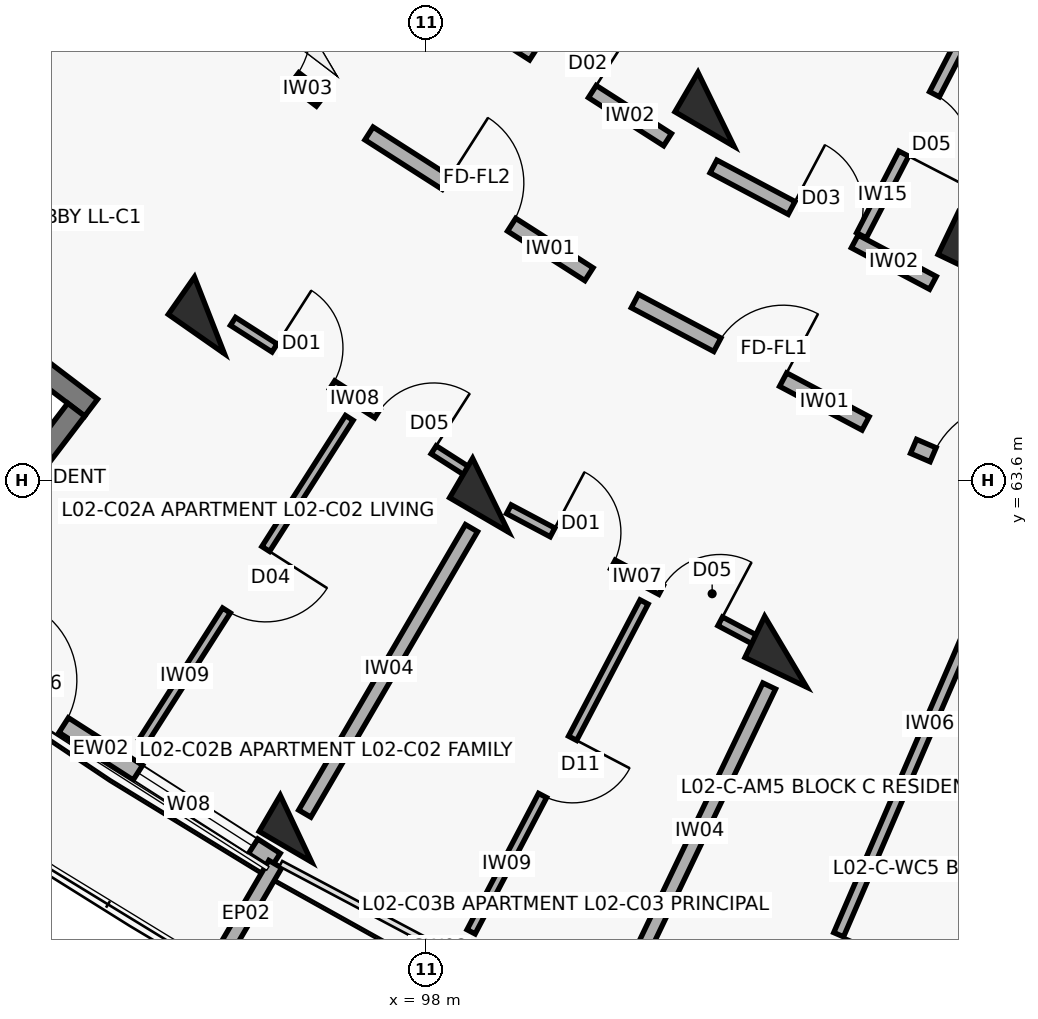
"""IFC4 building model, lengths in metres.
Left out: names, types, materials, properties, quantities, classifications, styles, units other than length and angle.
Written with IfcOpenShell. Run it as: python <this file> out.ifc"""

import sys

from ifc_helpers import new_model, si_unit, direction, frame, frame_2d, origin, origin_2d, place, context, subcontext, project, spatial, rectangle, extrude, element, fill, save


model = new_model("IFC4")
c1 = context("Model", 3, precision=1e-05, world=origin(), true_north=direction((0.0, 1.0)))
c2 = subcontext(c1, "Body", "Model", "MODEL_VIEW")
j1 = project(units=[si_unit("LENGTHUNIT", "METRE"), si_unit("PLANEANGLEUNIT", "RADIAN")], contexts=[c1])
p1 = place(None, origin())
s1 = spatial("IfcSite", under=j1, at=p1, CompositionType="ELEMENT")
p2 = place(p1, origin())
s2 = spatial("IfcBuilding", under=s1, at=p2, CompositionType="ELEMENT")
p3 = place(p2, frame((0.0, 0.0, 8.1)))
s3 = spatial("IfcBuildingStorey", under=s2, at=p3, CompositionType="ELEMENT", Elevation=8.1)
for number, where, z_axis, x_axis in (
    (1, (95.152, 65.768, 0.0), (0.0, 0.0, 1.0), (-0.573, -0.82, 0.0)),
    (2, (101.817, 68.478, 0.0), (0.0, 0.0, 1.0), (-0.504, -0.864, 0.0)),
    (3, (98.853, 63.4, 0.0), (0.0, 0.0, 1.0), (-0.504, -0.864, 0.0)),
):
    element("IfcColumn", number, at=place(p3, frame(where, z_axis=z_axis, x_axis=x_axis)), inside=s3, PredefinedType="COLUMN", context=c2, shape_type="SweptSolid", body=[
        extrude(rectangle(XDim=0.6, YDim=0.9, at=origin_2d()), origin(), (0.0, 0.0, 1.0), 3.1),
    ])
p4 = place(p3, frame((96.291, 59.013, 0.0), z_axis=(0.0, 0.0, 1.0), x_axis=(-0.504226211181, -0.863571611366, 0.0)))
e4 = element("IfcColumn", 4, at=p4, inside=s3, PredefinedType="COLUMN", context=c2, shape_type="SweptSolid", body=[
    extrude(rectangle(XDim=0.55, YDim=0.8, at=origin_2d()), origin(), (0.0, 0.0, 1.0), 3.1),
])
for number, where, z_axis, x_axis in (
    (5, (105.274, 66.644, 0.0), (0.0, 0.0, 1.0), (-0.432, -0.902, 0.0)),
    (6, (102.734, 61.341, 0.0), (0.0, 0.0, 1.0), (-0.432, -0.902, 0.0)),
):
    element("IfcColumn", number, at=place(p3, frame(where, z_axis=z_axis, x_axis=x_axis)), inside=s3, PredefinedType="COLUMN", context=c2, shape_type="SweptSolid", body=[
        extrude(rectangle(XDim=0.6, YDim=0.9, at=origin_2d()), origin(), (0.0, 0.0, 1.0), 3.1),
    ])
p5 = place(p3, frame((91.972, 61.184, 0.0), z_axis=(0.0, 0.0, 1.0), x_axis=(0.84226218024, -0.539068103061, 0.0)))
e7 = element("IfcWall", 7, at=p5, inside=s3, PredefinedType="SOLIDWALL", context=c2, shape_type="SweptSolid", body=[
    extrude(rectangle(XDim=4.809, YDim=0.23, at=frame_2d((2.404, 0.0))), origin(), (0.0, 0.0, 1.0), 2.25),
])
p6 = place(p5, frame((0.4, 0.0, 0.0)))
e8 = element("IfcOpeningElement", 8, at=p6, cuts=e7, PredefinedType="OPENING", context=c2, shape_type="SweptSolid", body=[
    extrude(rectangle(XDim=1.1, YDim=2.15, at=frame_2d((0.55, 1.075))), frame((0.0, 0.125, 0.0), z_axis=(0.0, -1.0, 0.0), x_axis=(1.0, 0.0, 0.0)), (0.0, 0.0, 1.0), 0.25),
])
p7 = place(p5, frame((2.659, 0.0, 0.35)))
e9 = element("IfcOpeningElement", 9, at=p7, cuts=e7, PredefinedType="OPENING", context=c2, shape_type="SweptSolid", body=[
    extrude(rectangle(XDim=1.8, YDim=1.65, at=frame_2d((0.9, 0.825))), frame((0.0, 0.125, 0.0), z_axis=(0.0, -1.0, 0.0), x_axis=(1.0, 0.0, 0.0)), (0.0, 0.0, 1.0), 0.25),
])
p8 = place(p3, frame((96.019, 58.547, 0.0), z_axis=(0.0, 0.0, 1.0), x_axis=(-0.504228145431, -0.863570481985, 0.0)))
e10 = element("IfcWall", 10, at=p8, inside=s3, PredefinedType="PARAPET", context=c2, shape_type="SweptSolid", body=[
    extrude(rectangle(XDim=1.53, YDim=0.195, at=frame_2d((0.765, 0.0))), origin(), (0.0, 0.0, 1.0), 2.25),
])
p9 = place(p3, frame((93.325, 70.899, 0.0), z_axis=(0.0, 0.0, 1.0), x_axis=(-0.668868253964, -0.743380964808, 0.0)))
e11 = element("IfcWall", 11, at=p9, inside=s3, PredefinedType="SHEAR", context=c2, shape_type="SweptSolid", body=[
    extrude(rectangle(XDim=7.69, YDim=0.3, at=frame_2d((3.845, 0.0))), origin(), (0.0, 0.0, 1.0), 3.1),
])
p10 = place(p3, frame((90.899, 66.607, 0.0), z_axis=(0.0, 0.0, 1.0), x_axis=(0.795439986025, -0.606032365994, 0.0)))
e12 = element("IfcWall", 12, at=p10, inside=s3, PredefinedType="SHEAR", context=c2, shape_type="SweptSolid", body=[
    extrude(rectangle(XDim=3.39, YDim=0.28, at=frame_2d((1.695, 0.0))), origin(), (0.0, 0.0, 1.0), 3.1),
])
p11 = place(p10, frame((1.095, 0.0, 0.0)))
e13 = element("IfcOpeningElement", 13, at=p11, cuts=e12, PredefinedType="OPENING", context=c2, shape_type="SweptSolid", body=[
    extrude(rectangle(XDim=1.2, YDim=2.15, at=frame_2d((0.6, 1.075))), frame((0.0, 0.15, 0.0), z_axis=(0.0, -1.0, 0.0), x_axis=(1.0, 0.0, 0.0)), (0.0, 0.0, 1.0), 0.3),
])
p12 = place(p3, frame((93.4, 64.526, 0.0), z_axis=(0.0, 0.0, 1.0), x_axis=(-0.605891019062, -0.795547656033, 0.0)))
e14 = element("IfcWall", 14, at=p12, inside=s3, PredefinedType="SHEAR", context=c2, shape_type="SweptSolid", body=[
    extrude(rectangle(XDim=2.03, YDim=0.28, at=frame_2d((1.015, 0.0))), origin(), (0.0, 0.0, 1.0), 3.1),
])
p13 = place(p3, frame((94.001, 70.602, 0.0), z_axis=(0.0, 0.0, 1.0), x_axis=(0.795498026433, -0.605956178235, 0.0)))
e15 = element("IfcWall", 15, at=p13, inside=s3, PredefinedType="SOLIDWALL", context=c2, shape_type="SweptSolid", body=[
    extrude(rectangle(XDim=3.296, YDim=0.21, at=frame_2d((1.648, 0.0))), origin(), (0.0, 0.0, 1.0), 2.08),
])
p14 = place(p13, frame((0.45, 0.0, 0.0)))
e16 = element("IfcOpeningElement", 16, at=p14, cuts=e15, PredefinedType="OPENING", context=c2, shape_type="SweptSolid", body=[
    extrude(rectangle(XDim=1.1, YDim=2.15, at=frame_2d((0.55, 1.075))), frame((0.0, 0.115, 0.0), z_axis=(0.0, -1.0, 0.0), x_axis=(1.0, 0.0, 0.0)), (0.0, 0.0, 1.0), 0.23),
])
p15 = place(p13, frame((1.726, 0.0, 0.0)))
e17 = element("IfcOpeningElement", 17, at=p15, cuts=e15, PredefinedType="OPENING", context=c2, shape_type="SweptSolid", body=[
    extrude(rectangle(XDim=1.12, YDim=2.15, at=frame_2d((0.56, 1.075))), frame((0.0, 0.115, 0.0), z_axis=(0.0, -1.0, 0.0), x_axis=(1.0, 0.0, 0.0)), (0.0, 0.0, 1.0), 0.23),
])
p16 = place(p3, frame((97.252, 68.161, 0.0), z_axis=(0.0, 0.0, 1.0), x_axis=(0.842289466461, -0.53902546757, 0.0)))
e18 = element("IfcWall", 18, at=p16, inside=s3, PredefinedType="SOLIDWALL", context=c2, shape_type="SweptSolid", body=[
    extrude(rectangle(XDim=3.436, YDim=0.2, at=frame_2d((1.718, 0.0))), origin(), (0.0, 0.0, 1.0), 2.08),
])
p17 = place(p16, frame((1.208, 0.0, 0.0)))
e19 = element("IfcOpeningElement", 19, at=p17, cuts=e18, PredefinedType="OPENING", context=c2, shape_type="SweptSolid", body=[
    extrude(rectangle(XDim=1.02, YDim=2.15, at=frame_2d((0.51, 1.075))), frame((0.0, 0.11, 0.0), z_axis=(0.0, -1.0, 0.0), x_axis=(1.0, 0.0, 0.0)), (0.0, 0.0, 1.0), 0.22),
])
p18 = place(p3, frame((98.427, 69.841, 0.0), z_axis=(0.0, 0.0, 1.0), x_axis=(0.842280895761, -0.539038860043, 0.0)))
e20 = element("IfcWall", 20, at=p18, inside=s3, PredefinedType="SOLIDWALL", context=c2, shape_type="SweptSolid", body=[
    extrude(rectangle(XDim=3.269, YDim=0.19, at=frame_2d((1.634, 0.0))), origin(), (0.0, 0.0, 1.0), 2.08),
])
p19 = place(p18, frame((1.174, 0.0, 0.0)))
e21 = element("IfcOpeningElement", 21, at=p19, cuts=e20, PredefinedType="OPENING", context=c2, shape_type="SweptSolid", body=[
    extrude(rectangle(XDim=0.92, YDim=2.1, at=frame_2d((0.46, 1.05))), frame((0.0, 0.105, 0.0), z_axis=(0.0, -1.0, 0.0), x_axis=(1.0, 0.0, 0.0)), (0.0, 0.0, 1.0), 0.21),
])
p20 = place(p3, frame((95.462, 65.688, 0.0), z_axis=(0.0, 0.0, 1.0), x_axis=(0.842274914974, -0.539048205271, 0.0)))
e22 = element("IfcWall", 22, at=p20, inside=s3, PredefinedType="PARTITIONING", context=c2, shape_type="SweptSolid", body=[
    extrude(rectangle(XDim=3.785, YDim=0.125, at=frame_2d((1.893, 0.0))), origin(), (0.0, 0.0, 1.0), 2.08),
])
p21 = place(p20, frame((0.65, 0.0, 0.0)))
e23 = element("IfcOpeningElement", 23, at=p21, cuts=e22, PredefinedType="OPENING", context=c2, shape_type="SweptSolid", body=[
    extrude(rectangle(XDim=0.9, YDim=2.1, at=frame_2d((0.45, 1.05))), frame((0.0, 0.073, 0.0), z_axis=(0.0, -1.0, 0.0), x_axis=(1.0, 0.0, 0.0)), (0.0, 0.0, 1.0), 0.145),
])
p22 = place(p20, frame((2.255, 0.0, 0.0)))
e24 = element("IfcOpeningElement", 24, at=p22, cuts=e22, PredefinedType="OPENING", context=c2, shape_type="SweptSolid", body=[
    extrude(rectangle(XDim=0.88, YDim=2.1, at=frame_2d((0.44, 1.05))), frame((0.0, 0.073, 0.0), z_axis=(0.0, -1.0, 0.0), x_axis=(1.0, 0.0, 0.0)), (0.0, 0.0, 1.0), 0.145),
])
p23 = place(p3, frame((96.993, 64.418, 0.0), z_axis=(0.0, 0.0, 1.0), x_axis=(-0.537785480308, -0.843081714409, 0.0)))
e25 = element("IfcWall", 25, at=p23, inside=s3, PredefinedType="PARTITIONING", context=c2, shape_type="SweptSolid", body=[
    extrude(rectangle(XDim=5.05, YDim=0.12, at=frame_2d((2.525, 0.0))), origin(), (0.0, 0.0, 1.0), 2.08),
])
p24 = place(p23, frame((2.045, 0.0, 0.0)))
e26 = element("IfcOpeningElement", 26, at=p24, cuts=e25, PredefinedType="OPENING", context=c2, shape_type="SweptSolid", body=[
    extrude(rectangle(XDim=0.96, YDim=2.1, at=frame_2d((0.48, 1.05))), frame((0.0, 0.07, 0.0), z_axis=(0.0, -1.0, 0.0), x_axis=(1.0, 0.0, 0.0)), (0.0, 0.0, 1.0), 0.14),
])
p25 = place(p3, frame((100.75, 65.956, 0.0), z_axis=(0.0, 0.0, 1.0), x_axis=(0.883440266101, -0.468543803963, 0.0)))
e27 = element("IfcWall", 27, at=p25, inside=s3, PredefinedType="SOLIDWALL", context=c2, shape_type="SweptSolid", body=[
    extrude(rectangle(XDim=3.436, YDim=0.2, at=frame_2d((1.718, 0.0))), origin(), (0.0, 0.0, 1.0), 2.08),
])
p26 = place(p25, frame((1.228, 0.0, 0.0)))
e28 = element("IfcOpeningElement", 28, at=p26, cuts=e27, PredefinedType="OPENING", context=c2, shape_type="SweptSolid", body=[
    extrude(rectangle(XDim=0.98, YDim=2.15, at=frame_2d((0.49, 1.075))), frame((0.0, 0.11, 0.0), z_axis=(0.0, -1.0, 0.0), x_axis=(1.0, 0.0, 0.0)), (0.0, 0.0, 1.0), 0.22),
])
p27 = place(p3, frame((101.784, 67.726, 0.0), z_axis=(0.0, 0.0, 1.0), x_axis=(0.883444301944, -0.468536194293, 0.0)))
e29 = element("IfcWall", 29, at=p27, inside=s3, PredefinedType="SOLIDWALL", context=c2, shape_type="SweptSolid", body=[
    extrude(rectangle(XDim=3.269, YDim=0.19, at=frame_2d((1.634, 0.0))), origin(), (0.0, 0.0, 1.0), 2.08),
])
p28 = place(p27, frame((1.164, 0.0, 0.0)))
e30 = element("IfcOpeningElement", 30, at=p28, cuts=e29, PredefinedType="OPENING", context=c2, shape_type="SweptSolid", body=[
    extrude(rectangle(XDim=0.94, YDim=2.1, at=frame_2d((0.47, 1.05))), frame((0.0, 0.105, 0.0), z_axis=(0.0, -1.0, 0.0), x_axis=(1.0, 0.0, 0.0)), (0.0, 0.0, 1.0), 0.21),
])
p29 = place(p3, frame((105.247, 69.752, 0.0), z_axis=(0.0, 0.0, 1.0), x_axis=(-0.459187433099, -0.888339406581, 0.0)))
e31 = element("IfcWall", 31, at=p29, inside=s3, PredefinedType="PARTITIONING", context=c2, shape_type="SweptSolid", body=[
    extrude(rectangle(XDim=3.3, YDim=0.145, at=frame_2d((1.65, 0.0))), origin(), (0.0, 0.0, 1.0), 2.08),
])
p30 = place(p29, frame((1.21, 0.0, 0.0)))
e32 = element("IfcOpeningElement", 32, at=p30, cuts=e31, PredefinedType="OPENING", context=c2, shape_type="SweptSolid", body=[
    extrude(rectangle(XDim=0.88, YDim=2.1, at=frame_2d((0.44, 1.05))), frame((0.0, 0.083, 0.0), z_axis=(0.0, -1.0, 0.0), x_axis=(1.0, 0.0, 0.0)), (0.0, 0.0, 1.0), 0.165),
])
p31 = place(p3, frame((99.093, 63.216, 0.0), z_axis=(0.0, 0.0, 1.0), x_axis=(0.883432667361, -0.468558131121, 0.0)))
e33 = element("IfcWall", 33, at=p31, inside=s3, PredefinedType="PARTITIONING", context=c2, shape_type="SweptSolid", body=[
    extrude(rectangle(XDim=3.797, YDim=0.13, at=frame_2d((1.899, 0.0))), origin(), (0.0, 0.0, 1.0), 2.08),
])
p32 = place(p31, frame((0.65, 0.0, 0.0)))
e34 = element("IfcOpeningElement", 34, at=p32, cuts=e33, PredefinedType="OPENING", context=c2, shape_type="SweptSolid", body=[
    extrude(rectangle(XDim=0.9, YDim=2.1, at=frame_2d((0.45, 1.05))), frame((0.0, 0.075, 0.0), z_axis=(0.0, -1.0, 0.0), x_axis=(1.0, 0.0, 0.0)), (0.0, 0.0, 1.0), 0.15),
])
p33 = place(p31, frame((2.267, 0.0, 0.0)))
e35 = element("IfcOpeningElement", 35, at=p33, cuts=e33, PredefinedType="OPENING", context=c2, shape_type="SweptSolid", body=[
    extrude(rectangle(XDim=0.88, YDim=2.1, at=frame_2d((0.44, 1.05))), frame((0.0, 0.075, 0.0), z_axis=(0.0, -1.0, 0.0), x_axis=(1.0, 0.0, 0.0)), (0.0, 0.0, 1.0), 0.15),
])
p34 = place(p3, frame((100.871, 61.996, 0.0), z_axis=(0.0, 0.0, 1.0), x_axis=(-0.464567298878, -0.885537816704, 0.0)))
e36 = element("IfcWall", 36, at=p34, inside=s3, PredefinedType="PARTITIONING", context=c2, shape_type="SweptSolid", body=[
    extrude(rectangle(XDim=4.9, YDim=0.12, at=frame_2d((2.45, 0.0))), origin(), (0.0, 0.0, 1.0), 2.08),
])
p35 = place(p34, frame((2.025, 0.0, 0.0)))
e37 = element("IfcOpeningElement", 37, at=p35, cuts=e36, PredefinedType="OPENING", context=c2, shape_type="SweptSolid", body=[
    extrude(rectangle(XDim=0.85, YDim=2.1, at=frame_2d((0.425, 1.05))), frame((0.0, 0.07, 0.0), z_axis=(0.0, -1.0, 0.0), x_axis=(1.0, 0.0, 0.0)), (0.0, 0.0, 1.0), 0.14),
])
p36 = place(p3, frame((98.601, 62.968, 0.0), z_axis=(0.0, 0.0, 1.0), x_axis=(-0.504216452091, -0.863577309475, 0.0)))
e38 = element("IfcWall", 38, at=p36, inside=s3, PredefinedType="SOLIDWALL", context=c2, shape_type="SweptSolid", body=[
    extrude(rectangle(XDim=4.35, YDim=0.185, at=frame_2d((2.175, 0.0))), origin(), (0.0, 0.0, 1.0), 2.08),
])
p37 = place(p3, frame((104.417, 64.044, 0.0), z_axis=(0.0, 0.0, 1.0), x_axis=(0.918718172399, -0.394913813008, 0.0)))
e39 = element("IfcWall", 39, at=p37, inside=s3, PredefinedType="SOLIDWALL", context=c2, shape_type="SweptSolid", body=[
    extrude(rectangle(XDim=3.436, YDim=0.2, at=frame_2d((1.718, 0.0))), origin(), (0.0, 0.0, 1.0), 2.08),
])
p38 = place(p37, frame((0.28, 0.0, 0.0)))
e40 = element("IfcOpeningElement", 40, at=p38, cuts=e39, PredefinedType="OPENING", context=c2, shape_type="SweptSolid", body=[
    extrude(rectangle(XDim=1.12, YDim=2.15, at=frame_2d((0.56, 1.075))), frame((0.0, 0.11, 0.0), z_axis=(0.0, -1.0, 0.0), x_axis=(1.0, 0.0, 0.0)), (0.0, 0.0, 1.0), 0.22),
])
p39 = place(p37, frame((2.266, 0.0, 0.0)))
e41 = element("IfcOpeningElement", 41, at=p39, cuts=e39, PredefinedType="OPENING", context=c2, shape_type="SweptSolid", body=[
    extrude(rectangle(XDim=0.95, YDim=2.1, at=frame_2d((0.475, 1.05))), frame((0.0, 0.11, 0.0), z_axis=(0.0, -1.0, 0.0), x_axis=(1.0, 0.0, 0.0)), (0.0, 0.0, 1.0), 0.22),
])
p40 = place(p3, frame((105.829, 63.173, 0.0), z_axis=(0.0, 0.0, 1.0), x_axis=(-0.396278945437, -0.91813016365, 0.0)))
e42 = element("IfcWall", 42, at=p40, inside=s3, PredefinedType="PARTITIONING", context=c2, shape_type="SweptSolid", body=[
    extrude(rectangle(XDim=7.95, YDim=0.14, at=frame_2d((3.975, 0.0))), origin(), (0.0, 0.0, 1.0), 2.08),
])
p41 = place(p40, frame((6.05, 0.0, 0.0)))
e43 = element("IfcOpeningElement", 43, at=p41, cuts=e42, PredefinedType="OPENING", context=c2, shape_type="SweptSolid", body=[
    extrude(rectangle(XDim=0.92, YDim=2.1, at=frame_2d((0.46, 1.05))), frame((0.0, 0.08, 0.0), z_axis=(0.0, -1.0, 0.0), x_axis=(1.0, 0.0, 0.0)), (0.0, 0.0, 1.0), 0.16),
])
p42 = place(p3, frame((102.518, 60.89, 0.0), z_axis=(0.0, 0.0, 1.0), x_axis=(-0.432108769108, -0.901821496561, 0.0)))
e44 = element("IfcWall", 44, at=p42, inside=s3, PredefinedType="SOLIDWALL", context=c2, shape_type="SweptSolid", body=[
    extrude(rectangle(XDim=4.35, YDim=0.185, at=frame_2d((2.175, 0.0))), origin(), (0.0, 0.0, 1.0), 2.08),
])
p43 = place(p3, frame((106.591, 59.139, 0.0), z_axis=(0.0, 0.0, 1.0), x_axis=(-0.357064016205, -0.934079915388, 0.0)))
e45 = element("IfcWall", 45, at=p43, inside=s3, PredefinedType="SOLIDWALL", context=c2, shape_type="SweptSolid", body=[
    extrude(rectangle(XDim=4.35, YDim=0.185, at=frame_2d((2.175, 0.0))), origin(), (0.0, 0.0, 1.0), 2.08),
])
p44 = place(p6, origin())
e46 = element("IfcDoor", 46, at=p44, inside=s3, OperationType="SINGLE_SWING_LEFT", PredefinedType="DOOR", context=c2, shape_type="SweptSolid", body=[
    extrude(rectangle(XDim=1.1, YDim=2.15, at=frame_2d((0.55, 1.075))), frame((0.0, 0.025, 0.0), z_axis=(0.0, -1.0, 0.0), x_axis=(1.0, 0.0, 0.0)), (0.0, 0.0, 1.0), 0.05),
])
fill(e8, e46)
p45 = place(p7, origin())
e47 = element("IfcWindow", 47, at=p45, inside=s3, PartitioningType="TRIPLE_PANEL_VERTICAL", PredefinedType="WINDOW", context=c2, shape_type="SweptSolid", body=[
    extrude(rectangle(XDim=1.8, YDim=1.65, at=frame_2d((0.9, 0.825))), frame((0.0, 0.03, 0.0), z_axis=(0.0, -1.0, 0.0), x_axis=(1.0, 0.0, 0.0)), (0.0, 0.0, 1.0), 0.06),
])
fill(e9, e47)
p46 = place(p15, origin())
e48 = element("IfcDoor", 48, at=p46, inside=s3, OperationType="SINGLE_SWING_LEFT", PredefinedType="DOOR", context=c2, shape_type="SweptSolid", body=[
    extrude(rectangle(XDim=1.12, YDim=2.15, at=frame_2d((0.56, 1.075))), frame((0.0, 0.025, 0.0), z_axis=(0.0, -1.0, 0.0), x_axis=(1.0, 0.0, 0.0)), (0.0, 0.0, 1.0), 0.05),
])
fill(e17, e48)
p47 = place(p17, origin())
e49 = element("IfcDoor", 49, at=p47, inside=s3, OperationType="SINGLE_SWING_LEFT", PredefinedType="DOOR", context=c2, shape_type="SweptSolid", body=[
    extrude(rectangle(XDim=1.02, YDim=2.15, at=frame_2d((0.51, 1.075))), frame((0.0, 0.025, 0.0), z_axis=(0.0, -1.0, 0.0), x_axis=(1.0, 0.0, 0.0)), (0.0, 0.0, 1.0), 0.05),
])
fill(e19, e49)
p48 = place(p19, origin())
e50 = element("IfcDoor", 50, at=p48, inside=s3, OperationType="SINGLE_SWING_RIGHT", PredefinedType="DOOR", context=c2, shape_type="SweptSolid", body=[
    extrude(rectangle(XDim=0.92, YDim=2.1, at=frame_2d((0.46, 1.05))), frame((0.0, 0.025, 0.0), z_axis=(0.0, -1.0, 0.0), x_axis=(1.0, 0.0, 0.0)), (0.0, 0.0, 1.0), 0.05),
])
fill(e21, e50)
p49 = place(p21, origin())
e51 = element("IfcDoor", 51, at=p49, inside=s3, OperationType="SINGLE_SWING_LEFT", PredefinedType="DOOR", context=c2, shape_type="SweptSolid", body=[
    extrude(rectangle(XDim=0.9, YDim=2.1, at=frame_2d((0.45, 1.05))), frame((0.0, 0.025, 0.0), z_axis=(0.0, -1.0, 0.0), x_axis=(1.0, 0.0, 0.0)), (0.0, 0.0, 1.0), 0.05),
])
fill(e23, e51)
p50 = place(p22, origin())
e52 = element("IfcDoor", 52, at=p50, inside=s3, OperationType="SINGLE_SWING_RIGHT", PredefinedType="DOOR", context=c2, shape_type="SweptSolid", body=[
    extrude(rectangle(XDim=0.88, YDim=2.1, at=frame_2d((0.44, 1.05))), frame((0.0, 0.025, 0.0), z_axis=(0.0, -1.0, 0.0), x_axis=(1.0, 0.0, 0.0)), (0.0, 0.0, 1.0), 0.05),
])
fill(e24, e52)
p51 = place(p24, origin())
e53 = element("IfcDoor", 53, at=p51, inside=s3, OperationType="SINGLE_SWING_LEFT", PredefinedType="DOOR", context=c2, shape_type="SweptSolid", body=[
    extrude(rectangle(XDim=0.96, YDim=2.1, at=frame_2d((0.48, 1.05))), frame((0.0, 0.025, 0.0), z_axis=(0.0, -1.0, 0.0), x_axis=(1.0, 0.0, 0.0)), (0.0, 0.0, 1.0), 0.05),
])
fill(e26, e53)
p52 = place(p26, origin())
e54 = element("IfcDoor", 54, at=p52, inside=s3, OperationType="SINGLE_SWING_RIGHT", PredefinedType="DOOR", context=c2, shape_type="SweptSolid", body=[
    extrude(rectangle(XDim=0.98, YDim=2.15, at=frame_2d((0.49, 1.075))), frame((0.0, 0.025, 0.0), z_axis=(0.0, -1.0, 0.0), x_axis=(1.0, 0.0, 0.0)), (0.0, 0.0, 1.0), 0.05),
])
fill(e28, e54)
p53 = place(p28, origin())
e55 = element("IfcDoor", 55, at=p53, inside=s3, OperationType="SINGLE_SWING_LEFT", PredefinedType="DOOR", context=c2, shape_type="SweptSolid", body=[
    extrude(rectangle(XDim=0.94, YDim=2.1, at=frame_2d((0.47, 1.05))), frame((0.0, 0.025, 0.0), z_axis=(0.0, -1.0, 0.0), x_axis=(1.0, 0.0, 0.0)), (0.0, 0.0, 1.0), 0.05),
])
fill(e30, e55)
p54 = place(p30, origin())
e56 = element("IfcDoor", 56, at=p54, inside=s3, OperationType="SINGLE_SWING_RIGHT", PredefinedType="DOOR", context=c2, shape_type="SweptSolid", body=[
    extrude(rectangle(XDim=0.88, YDim=2.1, at=frame_2d((0.44, 1.05))), frame((0.0, 0.025, 0.0), z_axis=(0.0, -1.0, 0.0), x_axis=(1.0, 0.0, 0.0)), (0.0, 0.0, 1.0), 0.05),
])
fill(e32, e56)
p55 = place(p32, origin())
e57 = element("IfcDoor", 57, at=p55, inside=s3, OperationType="SINGLE_SWING_LEFT", PredefinedType="DOOR", context=c2, shape_type="SweptSolid", body=[
    extrude(rectangle(XDim=0.9, YDim=2.1, at=frame_2d((0.45, 1.05))), frame((0.0, 0.025, 0.0), z_axis=(0.0, -1.0, 0.0), x_axis=(1.0, 0.0, 0.0)), (0.0, 0.0, 1.0), 0.05),
])
fill(e34, e57)
p56 = place(p33, origin())
e58 = element("IfcDoor", 58, at=p56, inside=s3, OperationType="SINGLE_SWING_RIGHT", PredefinedType="DOOR", context=c2, shape_type="SweptSolid", body=[
    extrude(rectangle(XDim=0.88, YDim=2.1, at=frame_2d((0.44, 1.05))), frame((0.0, 0.025, 0.0), z_axis=(0.0, -1.0, 0.0), x_axis=(1.0, 0.0, 0.0)), (0.0, 0.0, 1.0), 0.05),
])
fill(e35, e58)
p57 = place(p35, origin())
e59 = element("IfcDoor", 59, at=p57, inside=s3, OperationType="SINGLE_SWING_LEFT", PredefinedType="DOOR", context=c2, shape_type="SweptSolid", body=[
    extrude(rectangle(XDim=0.85, YDim=2.1, at=frame_2d((0.425, 1.05))), frame((0.0, 0.025, 0.0), z_axis=(0.0, -1.0, 0.0), x_axis=(1.0, 0.0, 0.0)), (0.0, 0.0, 1.0), 0.05),
])
fill(e37, e59)
p58 = place(p38, origin())
e60 = element("IfcDoor", 60, at=p58, inside=s3, OperationType="SINGLE_SWING_RIGHT", PredefinedType="DOOR", context=c2, shape_type="SweptSolid", body=[
    extrude(rectangle(XDim=1.12, YDim=2.15, at=frame_2d((0.56, 1.075))), frame((0.0, 0.025, 0.0), z_axis=(0.0, -1.0, 0.0), x_axis=(1.0, 0.0, 0.0)), (0.0, 0.0, 1.0), 0.05),
])
fill(e40, e60)
p59 = place(p41, origin())
e61 = element("IfcDoor", 61, at=p59, inside=s3, OperationType="SINGLE_SWING_LEFT", PredefinedType="DOOR", context=c2, shape_type="SweptSolid", body=[
    extrude(rectangle(XDim=0.92, YDim=2.1, at=frame_2d((0.46, 1.05))), frame((0.0, 0.025, 0.0), z_axis=(0.0, -1.0, 0.0), x_axis=(1.0, 0.0, 0.0)), (0.0, 0.0, 1.0), 0.05),
])
fill(e43, e61)
save(model, sys.argv[1])
